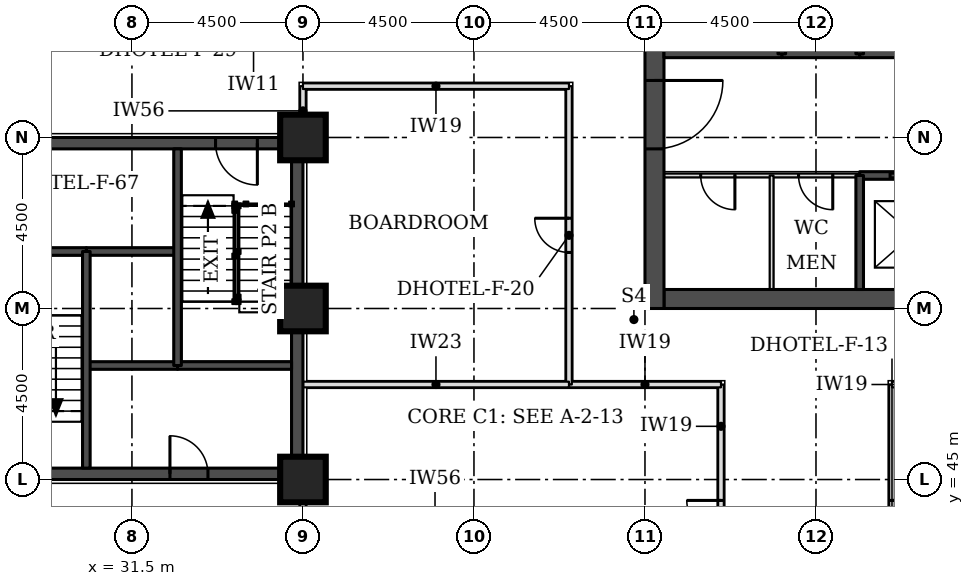
"""IFC4 building model, lengths in metres.
Left out: names, types, materials, properties, quantities, classifications, styles, units other than length and angle.
Written with IfcOpenShell. Run it as: python <this file> out.ifc"""

import sys

from ifc_helpers import new_model, si_unit, direction, frame, frame_2d, origin, origin_2d, place, context, subcontext, project, spatial, rectangle, extrude, element, fill, save


model = new_model("IFC4")
c1 = context("Model", 3, precision=1e-05, world=origin(), true_north=direction((0.0, 1.0)))
c2 = subcontext(c1, "Body", "Model", "MODEL_VIEW")
j1 = project(units=[si_unit("LENGTHUNIT", "METRE"), si_unit("PLANEANGLEUNIT", "RADIAN")], contexts=[c1])
p1 = place(None, origin())
s1 = spatial("IfcSite", under=j1, at=p1, CompositionType="ELEMENT")
p2 = place(p1, origin())
s2 = spatial("IfcBuilding", under=s1, at=p2, CompositionType="ELEMENT")
p3 = place(p2, frame((0.0, 0.0, 42.9)))
s3 = spatial("IfcBuildingStorey", under=s2, at=p3, CompositionType="ELEMENT", Elevation=42.9)
for number, where, z_axis, x_axis in (
    (1, (36.0, 45.0, 0.0), (0.0, 0.0, 1.0), (1.0, 0.0, 0.0)),
    (2, (36.0, 49.5, 0.0), (0.0, 0.0, 1.0), (1.0, 0.0, 0.0)),
    (3, (36.0, 54.0, 0.0), (0.0, 0.0, 1.0), (1.0, 0.0, 0.0)),
):
    element("IfcColumn", number, at=place(p3, frame(where, z_axis=z_axis, x_axis=x_axis)), inside=s3, PredefinedType="COLUMN", context=c2, shape_type="SweptSolid", body=[
        extrude(rectangle(XDim=1.2, YDim=1.2, at=origin_2d()), origin(), (0.0, 0.0, 1.0), 3.3),
    ])
p4 = place(p3, frame((45.5, 49.75, 0.0), z_axis=(0.0, 0.0, 1.0), x_axis=(1.0, 0.0, 0.0)))
e4 = element("IfcWall", 4, at=p4, inside=s3, PredefinedType="SHEAR", context=c2, shape_type="SweptSolid", body=[
    extrude(rectangle(XDim=21.5, YDim=0.5, at=frame_2d((10.75, 0.0))), origin(), (0.0, 0.0, 1.0), 3.3),
])
p5 = place(p3, frame((45.25, 49.5, 0.0), z_axis=(0.0, 0.0, 1.0), x_axis=(0.0, 1.0, 0.0)))
e5 = element("IfcWall", 5, at=p5, inside=s3, PredefinedType="SHEAR", context=c2, shape_type="SweptSolid", body=[
    extrude(rectangle(XDim=22.5, YDim=0.5, at=frame_2d((11.25, 0.0))), origin(), (0.0, 0.0, 1.0), 3.3),
])
p6 = place(p5, frame((4.2, 0.0, 0.0)))
e6 = element("IfcOpeningElement", 6, at=p6, cuts=e5, PredefinedType="OPENING", context=c2, shape_type="SweptSolid", body=[
    extrude(rectangle(XDim=1.8, YDim=2.1, at=frame_2d((0.9, 1.05))), frame((0.0, 0.26, 0.0), z_axis=(0.0, -1.0, 0.0), x_axis=(1.0, 0.0, 0.0)), (0.0, 0.0, 1.0), 0.52),
])
p7 = place(p5, frame((6.9, 0.0, 0.0)))
e7 = element("IfcOpeningElement", 7, at=p7, cuts=e5, PredefinedType="OPENING", context=c2, shape_type="SweptSolid", body=[
    extrude(rectangle(XDim=1.1, YDim=2.1, at=frame_2d((0.55, 1.05))), frame((0.0, 0.26, 0.0), z_axis=(0.0, -1.0, 0.0), x_axis=(1.0, 0.0, 0.0)), (0.0, 0.0, 1.0), 0.52),
])
p8 = place(p5, frame((13.6, 0.0, 0.0)))
e8 = element("IfcOpeningElement", 8, at=p8, cuts=e5, PredefinedType="OPENING", context=c2, shape_type="SweptSolid", body=[
    extrude(rectangle(XDim=1.1, YDim=2.1, at=frame_2d((0.55, 1.05))), frame((0.0, 0.26, 0.0), z_axis=(0.0, -1.0, 0.0), x_axis=(1.0, 0.0, 0.0)), (0.0, 0.0, 1.0), 0.52),
])
p9 = place(p5, frame((16.5, 0.0, 0.0)))
e9 = element("IfcOpeningElement", 9, at=p9, cuts=e5, PredefinedType="OPENING", context=c2, shape_type="SweptSolid", body=[
    extrude(rectangle(XDim=1.8, YDim=2.1, at=frame_2d((0.9, 1.05))), frame((0.0, 0.26, 0.0), z_axis=(0.0, -1.0, 0.0), x_axis=(1.0, 0.0, 0.0)), (0.0, 0.0, 1.0), 0.52),
])
p10 = place(p3, frame((27.3, 45.15, 0.0), z_axis=(0.0, 0.0, 1.0), x_axis=(1.0, 0.0, 0.0)))
e10 = element("IfcWall", 10, at=p10, inside=s3, PredefinedType="SHEAR", context=c2, shape_type="SweptSolid", body=[
    extrude(rectangle(XDim=8.4, YDim=0.3, at=frame_2d((4.2, 0.0))), origin(), (0.0, 0.0, 1.0), 3.3),
])
p11 = place(p10, frame((5.2, 0.0, 0.0)))
e11 = element("IfcOpeningElement", 11, at=p11, cuts=e10, PredefinedType="OPENING", context=c2, shape_type="SweptSolid", body=[
    extrude(rectangle(XDim=1.0, YDim=2.1, at=frame_2d((0.5, 1.05))), frame((0.0, 0.16, 0.0), z_axis=(0.0, -1.0, 0.0), x_axis=(1.0, 0.0, 0.0)), (0.0, 0.0, 1.0), 0.32),
])
p12 = place(p3, frame((27.3, 53.85, 0.0), z_axis=(0.0, 0.0, 1.0), x_axis=(1.0, 0.0, 0.0)))
e12 = element("IfcWall", 12, at=p12, inside=s3, PredefinedType="SHEAR", context=c2, shape_type="SweptSolid", body=[
    extrude(rectangle(XDim=8.4, YDim=0.3, at=frame_2d((4.2, 0.0))), origin(), (0.0, 0.0, 1.0), 3.3),
])
p13 = place(p12, frame((6.4, 0.0, 0.0)))
e13 = element("IfcOpeningElement", 13, at=p13, cuts=e12, PredefinedType="OPENING", context=c2, shape_type="SweptSolid", body=[
    extrude(rectangle(XDim=1.1, YDim=2.1, at=frame_2d((0.55, 1.05))), frame((0.0, 0.16, 0.0), z_axis=(0.0, -1.0, 0.0), x_axis=(1.0, 0.0, 0.0)), (0.0, 0.0, 1.0), 0.32),
])
p14 = place(p3, frame((35.85, 45.0, 0.0), z_axis=(0.0, 0.0, 1.0), x_axis=(0.0, 1.0, 0.0)))
e14 = element("IfcWall", 14, at=p14, inside=s3, PredefinedType="SHEAR", context=c2, shape_type="SweptSolid", body=[
    extrude(rectangle(XDim=9.0, YDim=0.3, at=frame_2d((4.5, 0.0))), origin(), (0.0, 0.0, 1.0), 3.3),
])
p15 = place(p3, frame((51.5, 23.65, 0.0), z_axis=(0.0, 0.0, 1.0), x_axis=(0.0, 1.0, 0.0)))
e15 = element("IfcWall", 15, at=p15, inside=s3, PredefinedType="PARTITIONING", context=c2, shape_type="SweptSolid", body=[
    extrude(rectangle(XDim=23.85, YDim=0.15, at=frame_2d((11.925, 0.0))), origin(), (0.0, 0.0, 1.0), 3.08),
])
p16 = place(p15, frame((1.65, 0.0, 0.0)))
e16 = element("IfcOpeningElement", 16, at=p16, cuts=e15, PredefinedType="OPENING", context=c2, shape_type="SweptSolid", body=[
    extrude(rectangle(XDim=1.0, YDim=2.1, at=frame_2d((0.5, 1.05))), frame((0.0, 0.085, 0.0), z_axis=(0.0, -1.0, 0.0), x_axis=(1.0, 0.0, 0.0)), (0.0, 0.0, 1.0), 0.17),
])
p17 = place(p15, frame((5.75, 0.0, 0.0)))
e17 = element("IfcOpeningElement", 17, at=p17, cuts=e15, PredefinedType="OPENING", context=c2, shape_type="SweptSolid", body=[
    extrude(rectangle(XDim=1.0, YDim=2.1, at=frame_2d((0.5, 1.05))), frame((0.0, 0.085, 0.0), z_axis=(0.0, -1.0, 0.0), x_axis=(1.0, 0.0, 0.0)), (0.0, 0.0, 1.0), 0.17),
])
p18 = place(p15, frame((15.15, 0.0, 0.0)))
e18 = element("IfcOpeningElement", 18, at=p18, cuts=e15, PredefinedType="OPENING", context=c2, shape_type="SweptSolid", body=[
    extrude(rectangle(XDim=1.0, YDim=2.1, at=frame_2d((0.5, 1.05))), frame((0.0, 0.085, 0.0), z_axis=(0.0, -1.0, 0.0), x_axis=(1.0, 0.0, 0.0)), (0.0, 0.0, 1.0), 0.17),
])
p19 = place(p15, frame((19.9, 0.0, 0.0)))
e19 = element("IfcOpeningElement", 19, at=p19, cuts=e15, PredefinedType="OPENING", context=c2, shape_type="SweptSolid", body=[
    extrude(rectangle(XDim=0.9, YDim=2.1, at=frame_2d((0.45, 1.05))), frame((0.0, 0.085, 0.0), z_axis=(0.0, -1.0, 0.0), x_axis=(1.0, 0.0, 0.0)), (0.0, 0.0, 1.0), 0.17),
])
p20 = place(p3, frame((36.0, 40.55, 0.0), z_axis=(0.0, 0.0, 1.0), x_axis=(0.0, 1.0, 0.0)))
e20 = element("IfcWall", 20, at=p20, inside=s3, PredefinedType="PARTITIONING", context=c2, shape_type="SweptSolid", body=[
    extrude(rectangle(XDim=4.4, YDim=0.15, at=frame_2d((2.2, 0.0))), origin(), (0.0, 0.0, 1.0), 2.33),
])
p21 = place(p3, frame((47.0, 40.5, 0.0), z_axis=(0.0, 0.0, 1.0), x_axis=(0.0, 1.0, 0.0)))
e21 = element("IfcWall", 21, at=p21, inside=s3, PredefinedType="PARTITIONING", context=c2, shape_type="SweptSolid", body=[
    extrude(rectangle(XDim=7.0, YDim=0.15, at=frame_2d((3.5, 0.0))), origin(), (0.0, 0.0, 1.0), 3.08),
])
p22 = place(p21, frame((3.05, 0.0, 0.0)))
e22 = element("IfcOpeningElement", 22, at=p22, cuts=e21, PredefinedType="OPENING", context=c2, shape_type="SweptSolid", body=[
    extrude(rectangle(XDim=0.9, YDim=2.1, at=frame_2d((0.45, 1.05))), frame((0.0, 0.085, 0.0), z_axis=(0.0, -1.0, 0.0), x_axis=(1.0, 0.0, 0.0)), (0.0, 0.0, 1.0), 0.17),
])
p23 = place(p3, frame((43.0, 47.5, 0.0), z_axis=(0.0, 0.0, 1.0), x_axis=(1.0, 0.0, 0.0)))
e23 = element("IfcWall", 23, at=p23, inside=s3, PredefinedType="PARTITIONING", context=c2, shape_type="SweptSolid", body=[
    extrude(rectangle(XDim=4.0, YDim=0.15, at=frame_2d((2.0, 0.0))), origin(), (0.0, 0.0, 1.0), 3.08),
])
p24 = place(p3, frame((43.0, 47.5, 0.0), z_axis=(0.0, 0.0, 1.0), x_axis=(0.0, 1.0, 0.0)))
e24 = element("IfcWall", 24, at=p24, inside=s3, PredefinedType="PARTITIONING", context=c2, shape_type="SweptSolid", body=[
    extrude(rectangle(XDim=7.85, YDim=0.15, at=frame_2d((3.925, 0.0))), origin(), (0.0, 0.0, 1.0), 3.08),
])
p25 = place(p24, frame((3.475, 0.0, 0.0)))
e25 = element("IfcOpeningElement", 25, at=p25, cuts=e24, PredefinedType="OPENING", context=c2, shape_type="SweptSolid", body=[
    extrude(rectangle(XDim=0.9, YDim=2.1, at=frame_2d((0.45, 1.05))), frame((0.0, 0.085, 0.0), z_axis=(0.0, -1.0, 0.0), x_axis=(1.0, 0.0, 0.0)), (0.0, 0.0, 1.0), 0.17),
])
p26 = place(p3, frame((51.5, 47.5, 0.0), z_axis=(0.0, 0.0, 1.0), x_axis=(1.0, 0.0, 0.0)))
e26 = element("IfcWall", 26, at=p26, inside=s3, PredefinedType="PARTITIONING", context=c2, shape_type="SweptSolid", body=[
    extrude(rectangle(XDim=18.0, YDim=0.15, at=frame_2d((9.0, 0.0))), origin(), (0.0, 0.0, 1.0), 3.08),
])
p27 = place(p26, frame((11.95, 0.0, 0.0)))
e27 = element("IfcOpeningElement", 27, at=p27, cuts=e26, PredefinedType="OPENING", context=c2, shape_type="SweptSolid", body=[
    extrude(rectangle(XDim=1.0, YDim=2.1, at=frame_2d((0.5, 1.05))), frame((0.0, 0.085, 0.0), z_axis=(0.0, -1.0, 0.0), x_axis=(1.0, 0.0, 0.0)), (0.0, 0.0, 1.0), 0.17),
])
p28 = place(p26, frame((9.8, 0.0, 0.0)))
e28 = element("IfcOpeningElement", 28, at=p28, cuts=e26, PredefinedType="OPENING", context=c2, shape_type="SweptSolid", body=[
    extrude(rectangle(XDim=1.0, YDim=2.1, at=frame_2d((0.5, 1.05))), frame((0.0, 0.085, 0.0), z_axis=(0.0, -1.0, 0.0), x_axis=(1.0, 0.0, 0.0)), (0.0, 0.0, 1.0), 0.17),
])
p29 = place(p26, frame((16.5, 0.0, 0.0)))
e29 = element("IfcOpeningElement", 29, at=p29, cuts=e26, PredefinedType="OPENING", context=c2, shape_type="SweptSolid", body=[
    extrude(rectangle(XDim=1.0, YDim=2.1, at=frame_2d((0.5, 1.05))), frame((0.0, 0.085, 0.0), z_axis=(0.0, -1.0, 0.0), x_axis=(1.0, 0.0, 0.0)), (0.0, 0.0, 1.0), 0.17),
])
p30 = place(p3, frame((36.0, 54.05, 0.0), z_axis=(0.0, 0.0, 1.0), x_axis=(0.0, 1.0, 0.0)))
e30 = element("IfcWall", 30, at=p30, inside=s3, PredefinedType="PARTITIONING", context=c2, shape_type="SweptSolid", body=[
    extrude(rectangle(XDim=1.3, YDim=0.15, at=frame_2d((0.65, 0.0))), origin(), (0.0, 0.0, 1.0), 2.33),
])
for number, where, z_axis, x_axis in (
    (31, (36.0, 55.35, 0.0), (0.0, 0.0, 1.0), (1.0, 0.0, 0.0)),
    (32, (36.0, 47.5, 0.0), (0.0, 0.0, 1.0), (1.0, 0.0, 0.0)),
):
    element("IfcWall", number, at=place(p3, frame(where, z_axis=z_axis, x_axis=x_axis)), inside=s3, PredefinedType="PARTITIONING", context=c2, shape_type="SweptSolid", body=[
        extrude(rectangle(XDim=7.0, YDim=0.15, at=frame_2d((3.5, 0.0))), origin(), (0.0, 0.0, 1.0), 3.08),
    ])
p31 = place(p3, frame((45.5, 53.0, 0.0), z_axis=(0.0, 0.0, 1.0), x_axis=(1.0, 0.0, 0.0)))
e33 = element("IfcWall", 33, at=p31, inside=s3, PredefinedType="PARTITIONING", context=c2, shape_type="SweptSolid", body=[
    extrude(rectangle(XDim=5.15, YDim=0.1, at=frame_2d((2.575, 0.0))), origin(), (0.0, 0.0, 1.0), 3.08),
])
p32 = place(p31, frame((0.966, 0.0, 0.0)))
e34 = element("IfcOpeningElement", 34, at=p32, cuts=e33, PredefinedType="OPENING", context=c2, shape_type="SweptSolid", body=[
    extrude(rectangle(XDim=0.9, YDim=2.1, at=frame_2d((0.45, 1.05))), frame((0.0, 0.06, 0.0), z_axis=(0.0, -1.0, 0.0), x_axis=(1.0, 0.0, 0.0)), (0.0, 0.0, 1.0), 0.12),
])
p33 = place(p31, frame((3.541, 0.0, 0.0)))
e35 = element("IfcOpeningElement", 35, at=p33, cuts=e33, PredefinedType="OPENING", context=c2, shape_type="SweptSolid", body=[
    extrude(rectangle(XDim=0.9, YDim=2.1, at=frame_2d((0.45, 1.05))), frame((0.0, 0.06, 0.0), z_axis=(0.0, -1.0, 0.0), x_axis=(1.0, 0.0, 0.0)), (0.0, 0.0, 1.0), 0.12),
])
p34 = place(p3, frame((50.65, 53.0, 0.0), z_axis=(0.0, 0.0, 1.0), x_axis=(1.0, 0.0, 0.0)))
e36 = element("IfcWall", 36, at=p34, inside=s3, PredefinedType="SOLIDWALL", context=c2, shape_type="SweptSolid", body=[
    extrude(rectangle(XDim=11.2, YDim=0.2, at=frame_2d((5.6, 0.0))), origin(), (0.0, 0.0, 1.0), 3.08),
])
p35 = place(p34, frame((0.8, 0.0, 0.0)))
e37 = element("IfcOpeningElement", 37, at=p35, cuts=e36, PredefinedType="OPENING", context=c2, shape_type="SweptSolid", body=[
    extrude(rectangle(XDim=1.2, YDim=2.1, at=frame_2d((0.6, 1.05))), frame((0.0, 0.11, 0.0), z_axis=(0.0, -1.0, 0.0), x_axis=(1.0, 0.0, 0.0)), (0.0, 0.0, 1.0), 0.22),
])
p36 = place(p34, frame((3.6, 0.0, 0.0)))
e38 = element("IfcOpeningElement", 38, at=p36, cuts=e36, PredefinedType="OPENING", context=c2, shape_type="SweptSolid", body=[
    extrude(rectangle(XDim=1.2, YDim=2.1, at=frame_2d((0.6, 1.05))), frame((0.0, 0.11, 0.0), z_axis=(0.0, -1.0, 0.0), x_axis=(1.0, 0.0, 0.0)), (0.0, 0.0, 1.0), 0.22),
])
p37 = place(p34, frame((6.4, 0.0, 0.0)))
e39 = element("IfcOpeningElement", 39, at=p37, cuts=e36, PredefinedType="OPENING", context=c2, shape_type="SweptSolid", body=[
    extrude(rectangle(XDim=1.2, YDim=2.1, at=frame_2d((0.6, 1.05))), frame((0.0, 0.11, 0.0), z_axis=(0.0, -1.0, 0.0), x_axis=(1.0, 0.0, 0.0)), (0.0, 0.0, 1.0), 0.22),
])
p38 = place(p34, frame((9.2, 0.0, 0.0)))
e40 = element("IfcOpeningElement", 40, at=p38, cuts=e36, PredefinedType="OPENING", context=c2, shape_type="SweptSolid", body=[
    extrude(rectangle(XDim=1.2, YDim=2.1, at=frame_2d((0.6, 1.05))), frame((0.0, 0.11, 0.0), z_axis=(0.0, -1.0, 0.0), x_axis=(1.0, 0.0, 0.0)), (0.0, 0.0, 1.0), 0.22),
])
p39 = place(p3, frame((48.6, 56.2, 0.0), z_axis=(0.0, 0.0, 1.0), x_axis=(1.0, 0.0, 0.0)))
e41 = element("IfcWall", 41, at=p39, inside=s3, PredefinedType="SOLIDWALL", context=c2, shape_type="SweptSolid", body=[
    extrude(rectangle(XDim=2.05, YDim=0.2, at=frame_2d((1.025, 0.0))), origin(), (0.0, 0.0, 1.0), 3.08),
])
p40 = place(p3, frame((45.5, 56.2, 0.0), z_axis=(0.0, 0.0, 1.0), x_axis=(1.0, 0.0, 0.0)))
e42 = element("IfcWall", 42, at=p40, inside=s3, PredefinedType="SOLIDWALL", context=c2, shape_type="SweptSolid", body=[
    extrude(rectangle(XDim=3.1, YDim=0.2, at=frame_2d((1.55, 0.0))), origin(), (0.0, 0.0, 1.0), 3.08),
])
p41 = place(p3, frame((50.65, 56.2, 0.0), z_axis=(0.0, 0.0, 1.0), x_axis=(1.0, 0.0, 0.0)))
e43 = element("IfcWall", 43, at=p41, inside=s3, PredefinedType="SOLIDWALL", context=c2, shape_type="SweptSolid", body=[
    extrude(rectangle(XDim=11.2, YDim=0.2, at=frame_2d((5.6, 0.0))), origin(), (0.0, 0.0, 1.0), 3.08),
])
p42 = place(p3, frame((48.333, 50.0, 0.0), z_axis=(0.0, 0.0, 1.0), x_axis=(0.0, 1.0, 0.0)))
e44 = element("IfcWall", 44, at=p42, inside=s3, PredefinedType="PARTITIONING", context=c2, shape_type="SweptSolid", body=[
    extrude(rectangle(XDim=3.0, YDim=0.1, at=frame_2d((1.5, 0.0))), origin(), (0.0, 0.0, 1.0), 3.08),
])
p43 = place(p3, frame((48.6, 56.2, 0.0), z_axis=(0.0, 0.0, 1.0), x_axis=(0.0, 1.0, 0.0)))
e45 = element("IfcWall", 45, at=p43, inside=s3, PredefinedType="SOLIDWALL", context=c2, shape_type="SweptSolid", body=[
    extrude(rectangle(XDim=5.8, YDim=0.2, at=frame_2d((2.9, 0.0))), origin(), (0.0, 0.0, 1.0), 3.08),
])
p44 = place(p3, frame((50.65, 50.0, 0.0), z_axis=(0.0, 0.0, 1.0), x_axis=(0.0, 1.0, 0.0)))
e46 = element("IfcWall", 46, at=p44, inside=s3, PredefinedType="SOLIDWALL", context=c2, shape_type="SweptSolid", body=[
    extrude(rectangle(XDim=3.0, YDim=0.2, at=frame_2d((1.5, 0.0))), origin(), (0.0, 0.0, 1.0), 3.08),
])
p45 = place(p3, frame((50.65, 56.2, 0.0), z_axis=(0.0, 0.0, 1.0), x_axis=(0.0, 1.0, 0.0)))
e47 = element("IfcWall", 47, at=p45, inside=s3, PredefinedType="SOLIDWALL", context=c2, shape_type="SweptSolid", body=[
    extrude(rectangle(XDim=2.8, YDim=0.2, at=frame_2d((1.4, 0.0))), origin(), (0.0, 0.0, 1.0), 3.08),
])
p46 = place(p3, frame((30.3, 48.0, 0.0), z_axis=(0.0, 0.0, 1.0), x_axis=(1.0, 0.0, 0.0)))
e48 = element("IfcWall", 48, at=p46, inside=s3, PredefinedType="SOLIDWALL", context=c2, shape_type="SweptSolid", body=[
    extrude(rectangle(XDim=2.4, YDim=0.2, at=frame_2d((1.2, 0.0))), origin(), (0.0, 0.0, 1.0), 3.08),
])
p47 = place(p3, frame((32.7, 48.0, 0.0), z_axis=(0.0, 0.0, 1.0), x_axis=(1.0, 0.0, 0.0)))
e49 = element("IfcWall", 49, at=p47, inside=s3, PredefinedType="SOLIDWALL", context=c2, shape_type="SweptSolid", body=[
    extrude(rectangle(XDim=3.0, YDim=0.2, at=frame_2d((1.5, 0.0))), origin(), (0.0, 0.0, 1.0), 3.08),
])
p48 = place(p3, frame((30.3, 51.0, 0.0), z_axis=(0.0, 0.0, 1.0), x_axis=(1.0, 0.0, 0.0)))
e50 = element("IfcWall", 50, at=p48, inside=s3, PredefinedType="SOLIDWALL", context=c2, shape_type="SweptSolid", body=[
    extrude(rectangle(XDim=2.4, YDim=0.2, at=frame_2d((1.2, 0.0))), origin(), (0.0, 0.0, 1.0), 3.3),
])
p49 = place(p3, frame((27.3, 51.0, 0.0), z_axis=(0.0, 0.0, 1.0), x_axis=(1.0, 0.0, 0.0)))
e51 = element("IfcWall", 51, at=p49, inside=s3, PredefinedType="SOLIDWALL", context=c2, shape_type="SweptSolid", body=[
    extrude(rectangle(XDim=3.0, YDim=0.2, at=frame_2d((1.5, 0.0))), origin(), (0.0, 0.0, 1.0), 3.08),
])
for number, where, z_axis, x_axis in (
    (52, (30.3, 45.3, 0.0), (0.0, 0.0, 1.0), (0.0, 1.0, 0.0)),
    (53, (32.7, 48.0, 0.0), (0.0, 0.0, 1.0), (0.0, 1.0, 0.0)),
):
    element("IfcWall", number, at=place(p3, frame(where, z_axis=z_axis, x_axis=x_axis)), inside=s3, PredefinedType="SOLIDWALL", context=c2, shape_type="SweptSolid", body=[
        extrude(rectangle(XDim=5.7, YDim=0.2, at=frame_2d((2.85, 0.0))), origin(), (0.0, 0.0, 1.0), 3.08),
    ])
p50 = place(p25, origin())
e54 = element("IfcDoor", 54, at=p50, inside=s3, OperationType="SINGLE_SWING_RIGHT", PredefinedType="DOOR", context=c2, shape_type="SweptSolid", body=[
    extrude(rectangle(XDim=0.9, YDim=2.1, at=frame_2d((0.45, 1.05))), frame((0.0, 0.025, 0.0), z_axis=(0.0, -1.0, 0.0), x_axis=(1.0, 0.0, 0.0)), (0.0, 0.0, 1.0), 0.05),
])
fill(e25, e54)
p51 = place(p22, origin())
e55 = element("IfcDoor", 55, at=p51, inside=s3, OperationType="SINGLE_SWING_RIGHT", PredefinedType="DOOR", context=c2, shape_type="SweptSolid", body=[
    extrude(rectangle(XDim=0.9, YDim=2.1, at=frame_2d((0.45, 1.05))), frame((0.0, 0.025, 0.0), z_axis=(0.0, -1.0, 0.0), x_axis=(1.0, 0.0, 0.0)), (0.0, 0.0, 1.0), 0.05),
])
fill(e22, e55)
p52 = place(p19, frame((0.9, 0.0, 0.0), z_axis=(0.0, 0.0, 1.0), x_axis=(-1.0, 0.0, 0.0)))
e56 = element("IfcDoor", 56, at=p52, inside=s3, OperationType="SINGLE_SWING_LEFT", PredefinedType="DOOR", context=c2, shape_type="SweptSolid", body=[
    extrude(rectangle(XDim=0.9, YDim=2.1, at=frame_2d((0.45, 1.05))), frame((0.0, 0.025, 0.0), z_axis=(0.0, -1.0, 0.0), x_axis=(1.0, 0.0, 0.0)), (0.0, 0.0, 1.0), 0.05),
])
fill(e19, e56)
p53 = place(p35, origin())
e57 = element("IfcDoor", 57, at=p53, inside=s3, OperationType="DOUBLE_DOOR_SLIDING", PredefinedType="DOOR", context=c2, shape_type="SweptSolid", body=[
    extrude(rectangle(XDim=1.2, YDim=2.1, at=frame_2d((0.6, 1.05))), frame((0.0, 0.025, 0.0), z_axis=(0.0, -1.0, 0.0), x_axis=(1.0, 0.0, 0.0)), (0.0, 0.0, 1.0), 0.05),
])
fill(e37, e57)
p54 = place(p6, frame((1.8, 0.0, 0.0), z_axis=(0.0, 0.0, 1.0), x_axis=(-1.0, 0.0, 0.0)))
e58 = element("IfcDoor", 58, at=p54, inside=s3, OperationType="SINGLE_SWING_LEFT", PredefinedType="DOOR", context=c2, shape_type="SweptSolid", body=[
    extrude(rectangle(XDim=1.8, YDim=2.1, at=frame_2d((0.9, 1.05))), frame((0.0, 0.025, 0.0), z_axis=(0.0, -1.0, 0.0), x_axis=(1.0, 0.0, 0.0)), (0.0, 0.0, 1.0), 0.05),
])
fill(e6, e58)
p55 = place(p32, frame((0.9, 0.0, 0.0), z_axis=(0.0, 0.0, 1.0), x_axis=(-1.0, 0.0, 0.0)))
e59 = element("IfcDoor", 59, at=p55, inside=s3, OperationType="SINGLE_SWING_LEFT", PredefinedType="DOOR", context=c2, shape_type="SweptSolid", body=[
    extrude(rectangle(XDim=0.9, YDim=2.1, at=frame_2d((0.45, 1.05))), frame((0.0, 0.025, 0.0), z_axis=(0.0, -1.0, 0.0), x_axis=(1.0, 0.0, 0.0)), (0.0, 0.0, 1.0), 0.05),
])
fill(e34, e59)
p56 = place(p33, frame((0.9, 0.0, 0.0), z_axis=(0.0, 0.0, 1.0), x_axis=(-1.0, 0.0, 0.0)))
e60 = element("IfcDoor", 60, at=p56, inside=s3, OperationType="SINGLE_SWING_LEFT", PredefinedType="DOOR", context=c2, shape_type="SweptSolid", body=[
    extrude(rectangle(XDim=0.9, YDim=2.1, at=frame_2d((0.45, 1.05))), frame((0.0, 0.025, 0.0), z_axis=(0.0, -1.0, 0.0), x_axis=(1.0, 0.0, 0.0)), (0.0, 0.0, 1.0), 0.05),
])
fill(e35, e60)
p57 = place(p13, frame((1.1, 0.0, 0.0), z_axis=(0.0, 0.0, 1.0), x_axis=(-1.0, 0.0, 0.0)))
e61 = element("IfcDoor", 61, at=p57, inside=s3, OperationType="SINGLE_SWING_LEFT", PredefinedType="DOOR", context=c2, shape_type="SweptSolid", body=[
    extrude(rectangle(XDim=1.1, YDim=2.1, at=frame_2d((0.55, 1.05))), frame((0.0, 0.025, 0.0), z_axis=(0.0, -1.0, 0.0), x_axis=(1.0, 0.0, 0.0)), (0.0, 0.0, 1.0), 0.05),
])
fill(e13, e61)
p58 = place(p11, origin())
e62 = element("IfcDoor", 62, at=p58, inside=s3, OperationType="SINGLE_SWING_LEFT", PredefinedType="DOOR", context=c2, shape_type="SweptSolid", body=[
    extrude(rectangle(XDim=1.0, YDim=2.1, at=frame_2d((0.5, 1.05))), frame((0.0, 0.025, 0.0), z_axis=(0.0, -1.0, 0.0), x_axis=(1.0, 0.0, 0.0)), (0.0, 0.0, 1.0), 0.05),
])
fill(e11, e62)
save(model, sys.argv[1])
